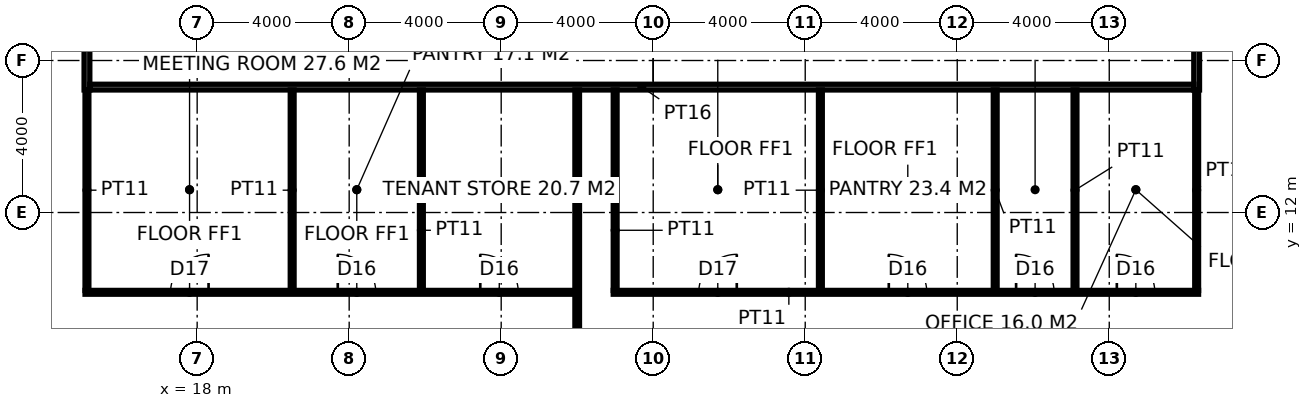
"""IFC4 building model, lengths in metres.
Left out: names, types, materials, properties, quantities, classifications, styles, units other than length and angle.
Written with IfcOpenShell. Run it as: python <this file> out.ifc"""

import sys

from ifc_helpers import new_model, si_unit, direction, frame, frame_2d, origin, place, context, subcontext, project, spatial, rectangle, extrude, element, fill, save


model = new_model("IFC4")
c1 = context("Model", 3, precision=1e-05, world=origin(), true_north=direction((0.0, 1.0)))
c2 = subcontext(c1, "Body", "Model", "MODEL_VIEW")
j1 = project(units=[si_unit("LENGTHUNIT", "METRE"), si_unit("PLANEANGLEUNIT", "RADIAN")], contexts=[c1])
p1 = place(None, origin())
s1 = spatial("IfcSite", under=j1, at=p1, CompositionType="ELEMENT")
p2 = place(p1, origin())
s2 = spatial("IfcBuilding", under=s1, at=p2, CompositionType="ELEMENT")
p3 = place(p2, frame((0.0, 0.0, 27.0)))
s3 = spatial("IfcBuildingStorey", under=s2, at=p3, CompositionType="ELEMENT", Elevation=27.0)
p4 = place(p3, frame((15.1, 15.225, 0.0), z_axis=(0.0, 0.0, 1.0), x_axis=(0.0, 1.0, 0.0)))
e1 = element("IfcWall", 1, at=p4, inside=s3, PredefinedType="PARTITIONING", context=c2, shape_type="SweptSolid", body=[
    extrude(rectangle(XDim=23.55, YDim=0.15, at=frame_2d((11.775, 0.0))), origin(), (0.0, 0.0, 1.0), 3.85),
])
p5 = place(p4, frame((3.175, 0.0, 0.0)))
e2 = element("IfcOpeningElement", 2, at=p5, cuts=e1, PredefinedType="OPENING", context=c2, shape_type="SweptSolid", body=[
    extrude(rectangle(XDim=1.8, YDim=2.4, at=frame_2d((0.9, 1.2))), frame((0.0, 0.085, 0.0), z_axis=(0.0, -1.0, 0.0), x_axis=(1.0, 0.0, 0.0)), (0.0, 0.0, 1.0), 0.17),
])
p6 = place(p4, frame((14.825, 0.0, 0.0)))
e3 = element("IfcOpeningElement", 3, at=p6, cuts=e1, PredefinedType="OPENING", context=c2, shape_type="SweptSolid", body=[
    extrude(rectangle(XDim=1.8, YDim=2.4, at=frame_2d((0.9, 1.2))), frame((0.0, 0.085, 0.0), z_axis=(0.0, -1.0, 0.0), x_axis=(1.0, 0.0, 0.0)), (0.0, 0.0, 1.0), 0.17),
])
p7 = place(p3, frame((44.3, 15.225, 0.0), z_axis=(0.0, 0.0, 1.0), x_axis=(0.0, 1.0, 0.0)))
e4 = element("IfcWall", 4, at=p7, inside=s3, PredefinedType="PARTITIONING", context=c2, shape_type="SweptSolid", body=[
    extrude(rectangle(XDim=23.55, YDim=0.15, at=frame_2d((11.775, 0.0))), origin(), (0.0, 0.0, 1.0), 3.85),
])
p8 = place(p7, frame((10.175, 0.0, 0.0)))
e5 = element("IfcOpeningElement", 5, at=p8, cuts=e4, PredefinedType="OPENING", context=c2, shape_type="SweptSolid", body=[
    extrude(rectangle(XDim=1.8, YDim=2.4, at=frame_2d((0.9, 1.2))), frame((0.0, 0.085, 0.0), z_axis=(0.0, -1.0, 0.0), x_axis=(1.0, 0.0, 0.0)), (0.0, 0.0, 1.0), 0.17),
])
p9 = place(p3, frame((15.175, 15.3, 0.0), z_axis=(0.0, 0.0, 1.0), x_axis=(1.0, 0.0, 0.0)))
e6 = element("IfcWall", 6, at=p9, inside=s3, PredefinedType="PARTITIONING", context=c2, shape_type="SweptSolid", body=[
    extrude(rectangle(XDim=29.05, YDim=0.15, at=frame_2d((14.525, 0.0))), origin(), (0.0, 0.0, 1.0), 3.85),
])
p10 = place(p3, frame((28.0, -3.7, 0.0), z_axis=(0.0, 0.0, 1.0), x_axis=(0.0, 1.0, 0.0)))
e7 = element("IfcWall", 7, at=p10, inside=s3, PredefinedType="PARTITIONING", context=c2, shape_type="SweptSolid", body=[
    extrude(rectangle(XDim=18.925, YDim=0.12, at=frame_2d((9.462, 0.0))), origin(), (0.0, 0.0, 1.0), 3.85),
])
p11 = place(p3, frame((15.05, 9.9, 0.0), z_axis=(0.0, 0.0, 1.0), x_axis=(1.0, 0.0, 0.0)))
e8 = element("IfcWall", 8, at=p11, inside=s3, PredefinedType="PARTITIONING", context=c2, shape_type="SweptSolid", body=[
    extrude(rectangle(XDim=12.889, YDim=0.1, at=frame_2d((6.444, 0.0))), origin(), (0.0, 0.0, 1.0), 3.85),
])
p12 = place(p11, frame((2.25, 0.0, 0.0)))
e9 = element("IfcOpeningElement", 9, at=p12, cuts=e8, PredefinedType="OPENING", context=c2, shape_type="SweptSolid", body=[
    extrude(rectangle(XDim=1.0, YDim=2.2, at=frame_2d((0.5, 1.1))), frame((0.0, 0.06, 0.0), z_axis=(0.0, -1.0, 0.0), x_axis=(1.0, 0.0, 0.0)), (0.0, 0.0, 1.0), 0.12),
])
p13 = place(p11, frame((6.65, 0.0, 0.0)))
e10 = element("IfcOpeningElement", 10, at=p13, cuts=e8, PredefinedType="OPENING", context=c2, shape_type="SweptSolid", body=[
    extrude(rectangle(XDim=1.0, YDim=2.2, at=frame_2d((0.5, 1.1))), frame((0.0, 0.06, 0.0), z_axis=(0.0, -1.0, 0.0), x_axis=(1.0, 0.0, 0.0)), (0.0, 0.0, 1.0), 0.12),
])
p14 = place(p11, frame((10.399, 0.0, 0.0)))
e11 = element("IfcOpeningElement", 11, at=p14, cuts=e8, PredefinedType="OPENING", context=c2, shape_type="SweptSolid", body=[
    extrude(rectangle(XDim=1.0, YDim=2.2, at=frame_2d((0.5, 1.1))), frame((0.0, 0.06, 0.0), z_axis=(0.0, -1.0, 0.0), x_axis=(1.0, 0.0, 0.0)), (0.0, 0.0, 1.0), 0.12),
])
p15 = place(p3, frame((28.949, 9.9, 0.0), z_axis=(0.0, 0.0, 1.0), x_axis=(1.0, 0.0, 0.0)))
e12 = element("IfcWall", 12, at=p15, inside=s3, PredefinedType="PARTITIONING", context=c2, shape_type="SweptSolid", body=[
    extrude(rectangle(XDim=15.401, YDim=0.1, at=frame_2d((7.701, 0.0))), origin(), (0.0, 0.0, 1.0), 3.85),
])
p16 = place(p15, frame((2.25, 0.0, 0.0)))
e13 = element("IfcOpeningElement", 13, at=p16, cuts=e12, PredefinedType="OPENING", context=c2, shape_type="SweptSolid", body=[
    extrude(rectangle(XDim=1.0, YDim=2.2, at=frame_2d((0.5, 1.1))), frame((0.0, 0.06, 0.0), z_axis=(0.0, -1.0, 0.0), x_axis=(1.0, 0.0, 0.0)), (0.0, 0.0, 1.0), 0.12),
])
p17 = place(p15, frame((7.25, 0.0, 0.0)))
e14 = element("IfcOpeningElement", 14, at=p17, cuts=e12, PredefinedType="OPENING", context=c2, shape_type="SweptSolid", body=[
    extrude(rectangle(XDim=1.0, YDim=2.2, at=frame_2d((0.5, 1.1))), frame((0.0, 0.06, 0.0), z_axis=(0.0, -1.0, 0.0), x_axis=(1.0, 0.0, 0.0)), (0.0, 0.0, 1.0), 0.12),
])
p18 = place(p15, frame((10.6, 0.0, 0.0)))
e15 = element("IfcOpeningElement", 15, at=p18, cuts=e12, PredefinedType="OPENING", context=c2, shape_type="SweptSolid", body=[
    extrude(rectangle(XDim=1.0, YDim=2.2, at=frame_2d((0.5, 1.1))), frame((0.0, 0.06, 0.0), z_axis=(0.0, -1.0, 0.0), x_axis=(1.0, 0.0, 0.0)), (0.0, 0.0, 1.0), 0.12),
])
p19 = place(p15, frame((13.25, 0.0, 0.0)))
e16 = element("IfcOpeningElement", 16, at=p19, cuts=e12, PredefinedType="OPENING", context=c2, shape_type="SweptSolid", body=[
    extrude(rectangle(XDim=1.0, YDim=2.2, at=frame_2d((0.5, 1.1))), frame((0.0, 0.06, 0.0), z_axis=(0.0, -1.0, 0.0), x_axis=(1.0, 0.0, 0.0)), (0.0, 0.0, 1.0), 0.12),
])
for number, where, z_axis, x_axis in (
    (17, (15.1, 9.95, 0.0), (0.0, 0.0, 1.0), (0.0, 1.0, 0.0)),
    (18, (20.5, 9.95, 0.0), (0.0, 0.0, 1.0), (0.0, 1.0, 0.0)),
    (19, (23.9, 9.95, 0.0), (0.0, 0.0, 1.0), (0.0, 1.0, 0.0)),
    (20, (28.999, 9.95, 0.0), (0.0, 0.0, 1.0), (0.0, 1.0, 0.0)),
    (21, (34.399, 9.95, 0.0), (0.0, 0.0, 1.0), (0.0, 1.0, 0.0)),
    (22, (38.999, 9.95, 0.0), (0.0, 0.0, 1.0), (0.0, 1.0, 0.0)),
    (23, (41.099, 9.95, 0.0), (0.0, 0.0, 1.0), (0.0, 1.0, 0.0)),
    (24, (44.3, 9.95, 0.0), (0.0, 0.0, 1.0), (0.0, 1.0, 0.0)),
):
    element("IfcWall", number, at=place(p3, frame(where, z_axis=z_axis, x_axis=x_axis)), inside=s3, PredefinedType="PARTITIONING", context=c2, shape_type="SweptSolid", body=[
        extrude(rectangle(XDim=5.275, YDim=0.1, at=frame_2d((2.638, 0.0))), origin(), (0.0, 0.0, 1.0), 3.85),
    ])
p20 = place(p12, origin())
e25 = element("IfcDoor", 25, at=p20, inside=s3, OperationType="SINGLE_SWING_RIGHT", PredefinedType="DOOR", context=c2, shape_type="SweptSolid", body=[
    extrude(rectangle(XDim=1.0, YDim=2.2, at=frame_2d((0.5, 1.1))), frame((0.0, 0.025, 0.0), z_axis=(0.0, -1.0, 0.0), x_axis=(1.0, 0.0, 0.0)), (0.0, 0.0, 1.0), 0.05),
])
fill(e9, e25)
p21 = place(p13, origin())
e26 = element("IfcDoor", 26, at=p21, inside=s3, OperationType="SINGLE_SWING_LEFT", PredefinedType="DOOR", context=c2, shape_type="SweptSolid", body=[
    extrude(rectangle(XDim=1.0, YDim=2.2, at=frame_2d((0.5, 1.1))), frame((0.0, 0.025, 0.0), z_axis=(0.0, -1.0, 0.0), x_axis=(1.0, 0.0, 0.0)), (0.0, 0.0, 1.0), 0.05),
])
fill(e10, e26)
p22 = place(p14, origin())
e27 = element("IfcDoor", 27, at=p22, inside=s3, OperationType="SINGLE_SWING_LEFT", PredefinedType="DOOR", context=c2, shape_type="SweptSolid", body=[
    extrude(rectangle(XDim=1.0, YDim=2.2, at=frame_2d((0.5, 1.1))), frame((0.0, 0.025, 0.0), z_axis=(0.0, -1.0, 0.0), x_axis=(1.0, 0.0, 0.0)), (0.0, 0.0, 1.0), 0.05),
])
fill(e11, e27)
p23 = place(p16, origin())
e28 = element("IfcDoor", 28, at=p23, inside=s3, OperationType="SINGLE_SWING_RIGHT", PredefinedType="DOOR", context=c2, shape_type="SweptSolid", body=[
    extrude(rectangle(XDim=1.0, YDim=2.2, at=frame_2d((0.5, 1.1))), frame((0.0, 0.025, 0.0), z_axis=(0.0, -1.0, 0.0), x_axis=(1.0, 0.0, 0.0)), (0.0, 0.0, 1.0), 0.05),
])
fill(e13, e28)
p24 = place(p17, origin())
e29 = element("IfcDoor", 29, at=p24, inside=s3, OperationType="SINGLE_SWING_LEFT", PredefinedType="DOOR", context=c2, shape_type="SweptSolid", body=[
    extrude(rectangle(XDim=1.0, YDim=2.2, at=frame_2d((0.5, 1.1))), frame((0.0, 0.025, 0.0), z_axis=(0.0, -1.0, 0.0), x_axis=(1.0, 0.0, 0.0)), (0.0, 0.0, 1.0), 0.05),
])
fill(e14, e29)
p25 = place(p18, origin())
e30 = element("IfcDoor", 30, at=p25, inside=s3, OperationType="SINGLE_SWING_LEFT", PredefinedType="DOOR", context=c2, shape_type="SweptSolid", body=[
    extrude(rectangle(XDim=1.0, YDim=2.2, at=frame_2d((0.5, 1.1))), frame((0.0, 0.025, 0.0), z_axis=(0.0, -1.0, 0.0), x_axis=(1.0, 0.0, 0.0)), (0.0, 0.0, 1.0), 0.05),
])
fill(e15, e30)
p26 = place(p19, origin())
e31 = element("IfcDoor", 31, at=p26, inside=s3, OperationType="SINGLE_SWING_LEFT", PredefinedType="DOOR", context=c2, shape_type="SweptSolid", body=[
    extrude(rectangle(XDim=1.0, YDim=2.2, at=frame_2d((0.5, 1.1))), frame((0.0, 0.025, 0.0), z_axis=(0.0, -1.0, 0.0), x_axis=(1.0, 0.0, 0.0)), (0.0, 0.0, 1.0), 0.05),
])
fill(e16, e31)
save(model, sys.argv[1])
